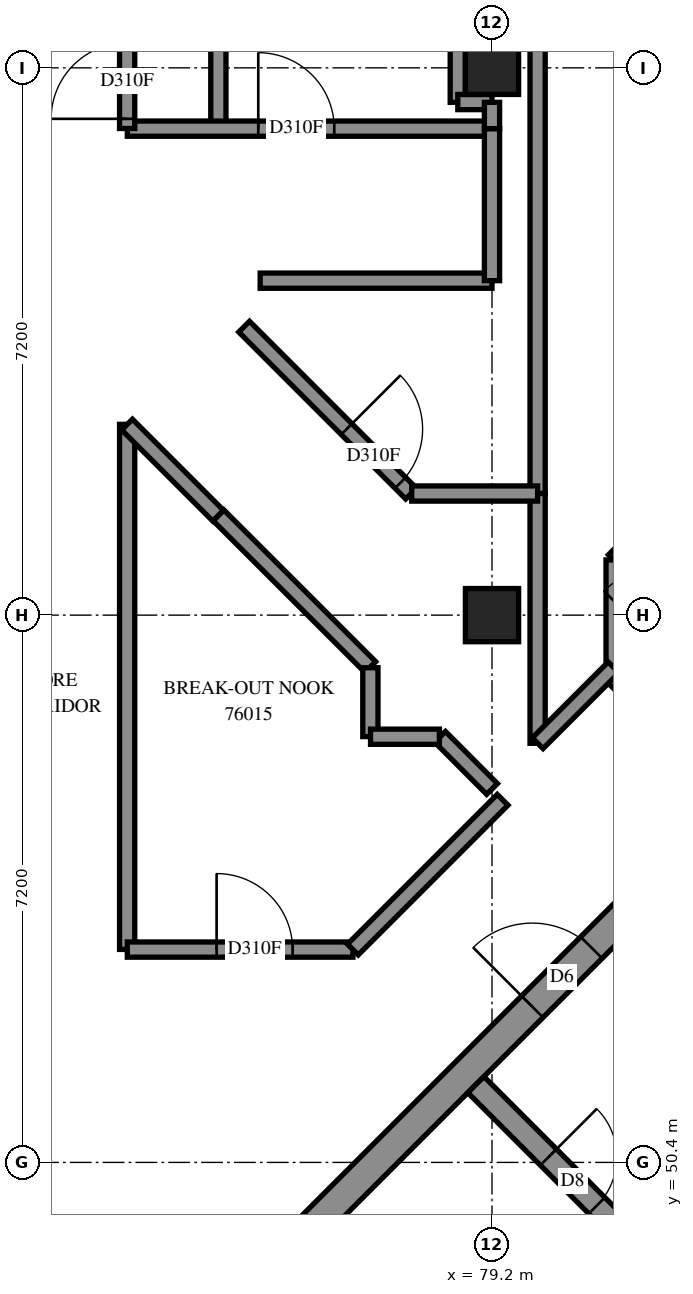
"""IFC4 building model, lengths in metres.
Left out: names, types, materials, properties, quantities, classifications, styles, units other than length and angle.
Written with IfcOpenShell. Run it as: python <this file> out.ifc"""

import sys

from ifc_helpers import new_model, si_unit, direction, frame, frame_2d, origin, origin_2d, place, context, subcontext, project, spatial, rectangle, extrude, element, fill, save


model = new_model("IFC4")
c1 = context("Model", 3, precision=1e-05, world=origin(), true_north=direction((0.0, 1.0)))
c2 = subcontext(c1, "Body", "Model", "MODEL_VIEW")
j1 = project(units=[si_unit("LENGTHUNIT", "METRE"), si_unit("PLANEANGLEUNIT", "RADIAN")], contexts=[c1])
p1 = place(None, origin())
s1 = spatial("IfcSite", under=j1, at=p1, CompositionType="ELEMENT")
p2 = place(p1, origin())
s2 = spatial("IfcBuilding", under=s1, at=p2, CompositionType="ELEMENT")
p3 = place(p2, frame((0.0, 0.0, 277.8)))
s3 = spatial("IfcBuildingStorey", under=s2, at=p3, CompositionType="ELEMENT", Elevation=277.8)
for number, where, z_axis, x_axis in (
    (1, (79.2, 57.6, 0.0), (0.0, 0.0, 1.0), (1.0, 0.0, 0.0)),
    (2, (79.2, 64.8, 0.0), (0.0, 0.0, 1.0), (1.0, 0.0, 0.0)),
):
    element("IfcColumn", number, at=place(p3, frame(where, z_axis=z_axis, x_axis=x_axis)), inside=s3, PredefinedType="COLUMN", context=c2, shape_type="SweptSolid", body=[
        extrude(rectangle(XDim=0.7, YDim=0.7, at=origin_2d()), origin(), (0.0, 0.0, 1.0), 3.1),
    ])
p4 = place(p3, frame((76.513, 49.231, -0.3), z_axis=(0.0, 0.0, 1.0), x_axis=(0.7071067812, 0.7071067812, 0.0)))
e3 = element("IfcWall", 3, at=p4, inside=s3, PredefinedType="SHEAR", context=c2, shape_type="SweptSolid", body=[
    extrude(rectangle(XDim=14.4, YDim=0.4, at=frame_2d((7.2, 0.0))), origin(), (0.0, 0.0, 1.0), 2.7),
])
p5 = place(p4, frame((4.55, 0.0, 0.3)))
e4 = element("IfcOpeningElement", 4, at=p5, cuts=e3, PredefinedType="OPENING", context=c2, shape_type="SweptSolid", body=[
    extrude(rectangle(XDim=1.1, YDim=2.1, at=frame_2d((0.55, 1.05))), frame((0.0, 0.21, 0.0), z_axis=(0.0, -1.0, 0.0), x_axis=(1.0, 0.0, 0.0)), (0.0, 0.0, 1.0), 0.42),
])
p6 = place(p4, frame((11.35, 0.0, 0.3)))
e5 = element("IfcOpeningElement", 5, at=p6, cuts=e3, PredefinedType="OPENING", context=c2, shape_type="SweptSolid", body=[
    extrude(rectangle(XDim=1.1, YDim=2.1, at=frame_2d((0.55, 1.05))), frame((0.0, 0.21, 0.0), z_axis=(0.0, -1.0, 0.0), x_axis=(1.0, 0.0, 0.0)), (0.0, 0.0, 1.0), 0.42),
])
p7 = place(p3, frame((78.988, 51.423, 0.0), z_axis=(0.0, 0.0, 1.0), x_axis=(0.7071067812, -0.7071067812, 0.0)))
e6 = element("IfcWall", 6, at=p7, inside=s3, PredefinedType="SOLIDWALL", context=c2, shape_type="SweptSolid", body=[
    extrude(rectangle(XDim=14.4, YDim=0.3, at=frame_2d((7.2, 0.0))), origin(), (0.0, 0.0, 1.0), 3.1),
])
p8 = place(p7, frame((1.35, 0.0, 0.0)))
e7 = element("IfcOpeningElement", 7, at=p8, cuts=e6, PredefinedType="OPENING", context=c2, shape_type="SweptSolid", body=[
    extrude(rectangle(XDim=0.9, YDim=2.1, at=frame_2d((0.45, 1.05))), frame((0.0, 0.16, 0.0), z_axis=(0.0, -1.0, 0.0), x_axis=(1.0, 0.0, 0.0)), (0.0, 0.0, 1.0), 0.32),
])
p9 = place(p7, frame((4.95, 0.0, 0.0)))
e8 = element("IfcOpeningElement", 8, at=p9, cuts=e6, PredefinedType="OPENING", context=c2, shape_type="SweptSolid", body=[
    extrude(rectangle(XDim=0.9, YDim=2.1, at=frame_2d((0.45, 1.05))), frame((0.0, 0.16, 0.0), z_axis=(0.0, -1.0, 0.0), x_axis=(1.0, 0.0, 0.0)), (0.0, 0.0, 1.0), 0.32),
])
p10 = place(p7, frame((8.55, 0.0, 0.0)))
e9 = element("IfcOpeningElement", 9, at=p10, cuts=e6, PredefinedType="OPENING", context=c2, shape_type="SweptSolid", body=[
    extrude(rectangle(XDim=0.9, YDim=2.1, at=frame_2d((0.45, 1.05))), frame((0.0, 0.16, 0.0), z_axis=(0.0, -1.0, 0.0), x_axis=(1.0, 0.0, 0.0)), (0.0, 0.0, 1.0), 0.32),
])
p11 = place(p7, frame((12.05, 0.0, 0.0)))
e10 = element("IfcOpeningElement", 10, at=p11, cuts=e6, PredefinedType="OPENING", context=c2, shape_type="SweptSolid", body=[
    extrude(rectangle(XDim=1.1, YDim=2.1, at=frame_2d((0.55, 1.05))), frame((0.0, 0.16, 0.0), z_axis=(0.0, -1.0, 0.0), x_axis=(1.0, 0.0, 0.0)), (0.0, 0.0, 1.0), 0.32),
])
p12 = place(p3, frame((79.8, 59.2, 0.0), z_axis=(0.0, 0.0, 1.0), x_axis=(0.0, 1.0, 0.0)))
e11 = element("IfcWall", 11, at=p12, inside=s3, PredefinedType="PARTITIONING", context=c2, shape_type="SweptSolid", body=[
    extrude(rectangle(XDim=13.8, YDim=0.2, at=frame_2d((6.9, 0.0))), origin(), (0.0, 0.0, 1.0), 3.1),
])
p13 = place(p3, frame((80.803, 58.323, 0.0), z_axis=(0.0, 0.0, 1.0), x_axis=(0.7070026249, 0.7072109222, 0.0)))
e12 = element("IfcWall", 12, at=p13, inside=s3, PredefinedType="PARTITIONING", context=c2, shape_type="SweptSolid", body=[
    extrude(rectangle(XDim=9.602, YDim=0.2, at=frame_2d((4.801, 0.0))), origin(), (0.0, 0.0, 1.0), 3.1),
])
p14 = place(p3, frame((75.6, 64.0, 0.0), z_axis=(0.0, 0.0, 1.0), x_axis=(0.0, 1.0, 0.0)))
e13 = element("IfcWall", 13, at=p14, inside=s3, PredefinedType="PARTITIONING", context=c2, shape_type="SweptSolid", body=[
    extrude(rectangle(XDim=8.75, YDim=0.2, at=frame_2d((4.375, 0.0))), origin(), (0.0, 0.0, 1.0), 3.1),
])
p15 = place(p3, frame((80.802, 56.633, 0.0), z_axis=(0.0, 0.0, 1.0), x_axis=(0.7071067812, 0.7071067812, 0.0)))
e14 = element("IfcWall", 14, at=p15, inside=s3, PredefinedType="PARTITIONING", context=c2, shape_type="SweptSolid", body=[
    extrude(rectangle(XDim=8.533, YDim=0.2, at=frame_2d((4.267, 0.0))), origin(), (0.0, 0.0, 1.0), 3.1),
])
p16 = place(p15, frame((0.817, 0.0, 0.0)))
e15 = element("IfcOpeningElement", 15, at=p16, cuts=e14, PredefinedType="OPENING", context=c2, shape_type="SweptSolid", body=[
    extrude(rectangle(XDim=1.0, YDim=2.1, at=frame_2d((0.5, 1.05))), frame((0.0, 0.11, 0.0), z_axis=(0.0, -1.0, 0.0), x_axis=(1.0, 0.0, 0.0)), (0.0, 0.0, 1.0), 0.22),
])
p17 = place(p3, frame((74.4, 53.202, 0.0), z_axis=(0.0, 0.0, 1.0), x_axis=(0.0, 1.0, 0.0)))
e16 = element("IfcWall", 16, at=p17, inside=s3, PredefinedType="PARTITIONING", context=c2, shape_type="SweptSolid", body=[
    extrude(rectangle(XDim=6.908, YDim=0.2, at=frame_2d((3.454, 0.0))), origin(), (0.0, 0.0, 1.0), 3.1),
])
p18 = place(p3, frame((74.402, 64.0, 0.0), z_axis=(0.0, 0.0, 1.0), x_axis=(1.0, 0.0, 0.0)))
e17 = element("IfcWall", 17, at=p18, inside=s3, PredefinedType="PARTITIONING", context=c2, shape_type="SweptSolid", body=[
    extrude(rectangle(XDim=4.798, YDim=0.2, at=frame_2d((2.399, 0.0))), origin(), (0.0, 0.0, 1.0), 3.1),
])
p19 = place(p18, frame((1.723, 0.0, 0.0)))
e18 = element("IfcOpeningElement", 18, at=p19, cuts=e17, PredefinedType="OPENING", context=c2, shape_type="SweptSolid", body=[
    extrude(rectangle(XDim=1.0, YDim=2.1, at=frame_2d((0.5, 1.05))), frame((0.0, 0.11, 0.0), z_axis=(0.0, -1.0, 0.0), x_axis=(1.0, 0.0, 0.0)), (0.0, 0.0, 1.0), 0.22),
])
p20 = place(p3, frame((79.8, 55.914, 0.0), z_axis=(0.0, 0.0, 1.0), x_axis=(0.0, 1.0, 0.0)))
e19 = element("IfcWall", 19, at=p20, inside=s3, PredefinedType="PARTITIONING", context=c2, shape_type="SweptSolid", body=[
    extrude(rectangle(XDim=3.286, YDim=0.2, at=frame_2d((1.643, 0.0))), origin(), (0.0, 0.0, 1.0), 3.1),
])
p21 = place(p3, frame((74.4, 64.002, 0.0), z_axis=(0.0, 0.0, 1.0), x_axis=(0.0, 1.0, 0.0)))
e20 = element("IfcWall", 20, at=p21, inside=s3, PredefinedType="PARTITIONING", context=c2, shape_type="SweptSolid", body=[
    extrude(rectangle(XDim=3.198, YDim=0.2, at=frame_2d((1.599, 0.0))), origin(), (0.0, 0.0, 1.0), 3.1),
])
p22 = place(p21, frame((0.127, 0.0, 0.0)))
e21 = element("IfcOpeningElement", 21, at=p22, cuts=e20, PredefinedType="OPENING", context=c2, shape_type="SweptSolid", body=[
    extrude(rectangle(XDim=1.0, YDim=2.1, at=frame_2d((0.5, 1.05))), frame((0.0, 0.11, 0.0), z_axis=(0.0, -1.0, 0.0), x_axis=(1.0, 0.0, 0.0)), (0.0, 0.0, 1.0), 0.22),
])
p23 = place(p3, frame((75.939, 61.395, 0.0), z_axis=(0.0, 0.0, 1.0), x_axis=(0.7071067812, -0.7071067812, 0.0)))
e22 = element("IfcWall", 22, at=p23, inside=s3, PredefinedType="PARTITIONING", context=c2, shape_type="SweptSolid", body=[
    extrude(rectangle(XDim=3.106, YDim=0.2, at=frame_2d((1.553, 0.0))), origin(), (0.0, 0.0, 1.0), 3.1),
])
p24 = place(p23, frame((1.906, 0.0, 0.0)))
e23 = element("IfcOpeningElement", 23, at=p24, cuts=e22, PredefinedType="OPENING", context=c2, shape_type="SweptSolid", body=[
    extrude(rectangle(XDim=1.0, YDim=2.1, at=frame_2d((0.5, 1.05))), frame((0.0, 0.11, 0.0), z_axis=(0.0, -1.0, 0.0), x_axis=(1.0, 0.0, 0.0)), (0.0, 0.0, 1.0), 0.22),
])
p25 = place(p3, frame((76.15, 62.0, 0.0), z_axis=(0.0, 0.0, 1.0), x_axis=(1.0, 0.0, 0.0)))
e24 = element("IfcWall", 24, at=p25, inside=s3, PredefinedType="PARTITIONING", context=c2, shape_type="SweptSolid", body=[
    extrude(rectangle(XDim=3.05, YDim=0.2, at=frame_2d((1.525, 0.0))), origin(), (0.0, 0.0, 1.0), 3.1),
])
p26 = place(p3, frame((74.402, 53.2, 0.0), z_axis=(0.0, 0.0, 1.0), x_axis=(1.0, 0.0, 0.0)))
e25 = element("IfcWall", 25, at=p26, inside=s3, PredefinedType="PARTITIONING", context=c2, shape_type="SweptSolid", body=[
    extrude(rectangle(XDim=2.968, YDim=0.2, at=frame_2d((1.484, 0.0))), origin(), (0.0, 0.0, 1.0), 3.1),
])
p27 = place(p26, frame((1.175, 0.0, 0.0)))
e26 = element("IfcOpeningElement", 26, at=p27, cuts=e25, PredefinedType="OPENING", context=c2, shape_type="SweptSolid", body=[
    extrude(rectangle(XDim=1.0, YDim=2.1, at=frame_2d((0.5, 1.05))), frame((0.0, 0.11, 0.0), z_axis=(0.0, -1.0, 0.0), x_axis=(1.0, 0.0, 0.0)), (0.0, 0.0, 1.0), 0.22),
])
p28 = place(p3, frame((75.601, 58.913, 0.0), z_axis=(0.0, 0.0, 1.0), x_axis=(0.707460777, -0.7067526081, 0.0)))
e27 = element("IfcWall", 27, at=p28, inside=s3, PredefinedType="PARTITIONING", context=c2, shape_type="SweptSolid", body=[
    extrude(rectangle(XDim=2.824, YDim=0.2, at=frame_2d((1.412, 0.0))), origin(), (0.0, 0.0, 1.0), 3.1),
])
p29 = place(p3, frame((77.37, 53.2, 0.0), z_axis=(0.0, 0.0, 1.0), x_axis=(0.7071067812, 0.7071067812, 0.0)))
e28 = element("IfcWall", 28, at=p29, inside=s3, PredefinedType="PARTITIONING", context=c2, shape_type="SweptSolid", body=[
    extrude(rectangle(XDim=2.786, YDim=0.2, at=frame_2d((1.393, 0.0))), origin(), (0.0, 0.0, 1.0), 3.1),
])
p30 = place(p3, frame((79.2, 62.0, 0.0), z_axis=(0.0, 0.0, 1.0), x_axis=(0.0, 1.0, 0.0)))
e29 = element("IfcWall", 29, at=p30, inside=s3, PredefinedType="PARTITIONING", context=c2, shape_type="SweptSolid", body=[
    extrude(rectangle(XDim=2.0, YDim=0.2, at=frame_2d((1.0, 0.0))), origin(), (0.0, 0.0, 1.0), 3.1),
])
p31 = place(p3, frame((74.399, 60.107, 0.0), z_axis=(0.0, 0.0, 1.0), x_axis=(0.7071067812, -0.7071067812, 0.0)))
e30 = element("IfcWall", 30, at=p31, inside=s3, PredefinedType="PARTITIONING", context=c2, shape_type="SweptSolid", body=[
    extrude(rectangle(XDim=1.694, YDim=0.2, at=frame_2d((0.847, 0.0))), origin(), (0.0, 0.0, 1.0), 3.1),
])
p32 = place(p3, frame((78.144, 59.2, 0.0), z_axis=(0.0, 0.0, 1.0), x_axis=(1.0, 0.0, 0.0)))
e31 = element("IfcWall", 31, at=p32, inside=s3, PredefinedType="PARTITIONING", context=c2, shape_type="SweptSolid", body=[
    extrude(rectangle(XDim=1.656, YDim=0.2, at=frame_2d((0.828, 0.0))), origin(), (0.0, 0.0, 1.0), 3.1),
])
p33 = place(p3, frame((80.8, 56.912, 0.0), z_axis=(0.0, 0.0, 1.0), x_axis=(0.0, 1.0, 0.0)))
e32 = element("IfcWall", 32, at=p33, inside=s3, PredefinedType="PARTITIONING", context=c2, shape_type="SweptSolid", body=[
    extrude(rectangle(XDim=1.414, YDim=0.2, at=frame_2d((0.707, 0.0))), origin(), (0.0, 0.0, 1.0), 3.1),
])
p34 = place(p3, frame((79.801, 55.915, 0.0), z_axis=(0.0, 0.0, 1.0), x_axis=(0.7071067812, 0.7071067812, 0.0)))
e33 = element("IfcWall", 33, at=p34, inside=s3, PredefinedType="PARTITIONING", context=c2, shape_type="SweptSolid", body=[
    extrude(rectangle(XDim=1.411, YDim=0.2, at=frame_2d((0.706, 0.0))), origin(), (0.0, 0.0, 1.0), 3.1),
])
p35 = place(p3, frame((78.517, 55.999, 0.0), z_axis=(0.0, 0.0, 1.0), x_axis=(0.7060737561, -0.7081382993, 0.0)))
e34 = element("IfcWall", 34, at=p35, inside=s3, PredefinedType="PARTITIONING", context=c2, shape_type="SweptSolid", body=[
    extrude(rectangle(XDim=0.969, YDim=0.2, at=frame_2d((0.484, 0.0))), origin(), (0.0, 0.0, 1.0), 3.1),
])
p36 = place(p3, frame((78.75, 64.346, 0.0), z_axis=(0.0, 0.0, 1.0), x_axis=(0.0, 1.0, 0.0)))
e35 = element("IfcWall", 35, at=p36, inside=s3, PredefinedType="PARTITIONING", context=c2, shape_type="SweptSolid", body=[
    extrude(rectangle(XDim=0.908, YDim=0.2, at=frame_2d((0.454, 0.0))), origin(), (0.0, 0.0, 1.0), 3.1),
])
for number, where, z_axis, x_axis in (
    (36, (77.6, 56.002, 0.0), (0.0, 0.0, 1.0), (0.0, 1.0, 0.0)),
    (37, (77.602, 56.0, 0.0), (0.0, 0.0, 1.0), (1.0, 0.0, 0.0)),
):
    element("IfcWall", number, at=place(p3, frame(where, z_axis=z_axis, x_axis=x_axis)), inside=s3, PredefinedType="PARTITIONING", context=c2, shape_type="SweptSolid", body=[
        extrude(rectangle(XDim=0.906, YDim=0.2, at=frame_2d((0.453, 0.0))), origin(), (0.0, 0.0, 1.0), 3.1),
    ])
p37 = place(p3, frame((78.75, 64.35, 0.0), z_axis=(0.0, 0.0, 1.0), x_axis=(1.0, 0.0, 0.0)))
e38 = element("IfcWall", 38, at=p37, inside=s3, PredefinedType="PARTITIONING", context=c2, shape_type="SweptSolid", body=[
    extrude(rectangle(XDim=0.45, YDim=0.2, at=frame_2d((0.225, 0.0))), origin(), (0.0, 0.0, 1.0), 3.1),
])
p38 = place(p3, frame((79.2, 64.0, 0.0), z_axis=(0.0, 0.0, 1.0), x_axis=(0.0, 1.0, 0.0)))
e39 = element("IfcWall", 39, at=p38, inside=s3, PredefinedType="PARTITIONING", context=c2, shape_type="SweptSolid", body=[
    extrude(rectangle(XDim=0.346, YDim=0.2, at=frame_2d((0.173, 0.0))), origin(), (0.0, 0.0, 1.0), 3.1),
])
p39 = place(p5, origin())
e40 = element("IfcDoor", 40, at=p39, inside=s3, OperationType="DOUBLE_DOOR_SINGLE_SWING", PredefinedType="DOOR", context=c2, shape_type="SweptSolid", body=[
    extrude(rectangle(XDim=1.1, YDim=2.1, at=frame_2d((0.55, 1.05))), frame((0.0, 0.025, 0.0), z_axis=(0.0, -1.0, 0.0), x_axis=(1.0, 0.0, 0.0)), (0.0, 0.0, 1.0), 0.05),
])
fill(e4, e40)
p40 = place(p8, origin())
e41 = element("IfcDoor", 41, at=p40, inside=s3, OperationType="SINGLE_SWING_LEFT", PredefinedType="DOOR", context=c2, shape_type="SweptSolid", body=[
    extrude(rectangle(XDim=0.9, YDim=2.1, at=frame_2d((0.45, 1.05))), frame((0.0, 0.025, 0.0), z_axis=(0.0, -1.0, 0.0), x_axis=(1.0, 0.0, 0.0)), (0.0, 0.0, 1.0), 0.05),
])
fill(e7, e41)
p41 = place(p27, origin())
e42 = element("IfcDoor", 42, at=p41, inside=s3, OperationType="SINGLE_SWING_LEFT", PredefinedType="DOOR", context=c2, shape_type="SweptSolid", body=[
    extrude(rectangle(XDim=1.0, YDim=2.1, at=frame_2d((0.5, 1.05))), frame((0.0, 0.025, 0.0), z_axis=(0.0, -1.0, 0.0), x_axis=(1.0, 0.0, 0.0)), (0.0, 0.0, 1.0), 0.05),
])
fill(e26, e42)
p42 = place(p22, origin())
e43 = element("IfcDoor", 43, at=p42, inside=s3, OperationType="SINGLE_SWING_RIGHT", PredefinedType="DOOR", context=c2, shape_type="SweptSolid", body=[
    extrude(rectangle(XDim=1.0, YDim=2.1, at=frame_2d((0.5, 1.05))), frame((0.0, 0.025, 0.0), z_axis=(0.0, -1.0, 0.0), x_axis=(1.0, 0.0, 0.0)), (0.0, 0.0, 1.0), 0.05),
])
fill(e21, e43)
p43 = place(p19, origin())
e44 = element("IfcDoor", 44, at=p43, inside=s3, OperationType="SINGLE_SWING_LEFT", PredefinedType="DOOR", context=c2, shape_type="SweptSolid", body=[
    extrude(rectangle(XDim=1.0, YDim=2.1, at=frame_2d((0.5, 1.05))), frame((0.0, 0.025, 0.0), z_axis=(0.0, -1.0, 0.0), x_axis=(1.0, 0.0, 0.0)), (0.0, 0.0, 1.0), 0.05),
])
fill(e18, e44)
p44 = place(p24, origin())
e45 = element("IfcDoor", 45, at=p44, inside=s3, OperationType="SINGLE_SWING_LEFT", PredefinedType="DOOR", context=c2, shape_type="SweptSolid", body=[
    extrude(rectangle(XDim=1.0, YDim=2.1, at=frame_2d((0.5, 1.05))), frame((0.0, 0.025, 0.0), z_axis=(0.0, -1.0, 0.0), x_axis=(1.0, 0.0, 0.0)), (0.0, 0.0, 1.0), 0.05),
])
fill(e23, e45)
save(model, sys.argv[1])
